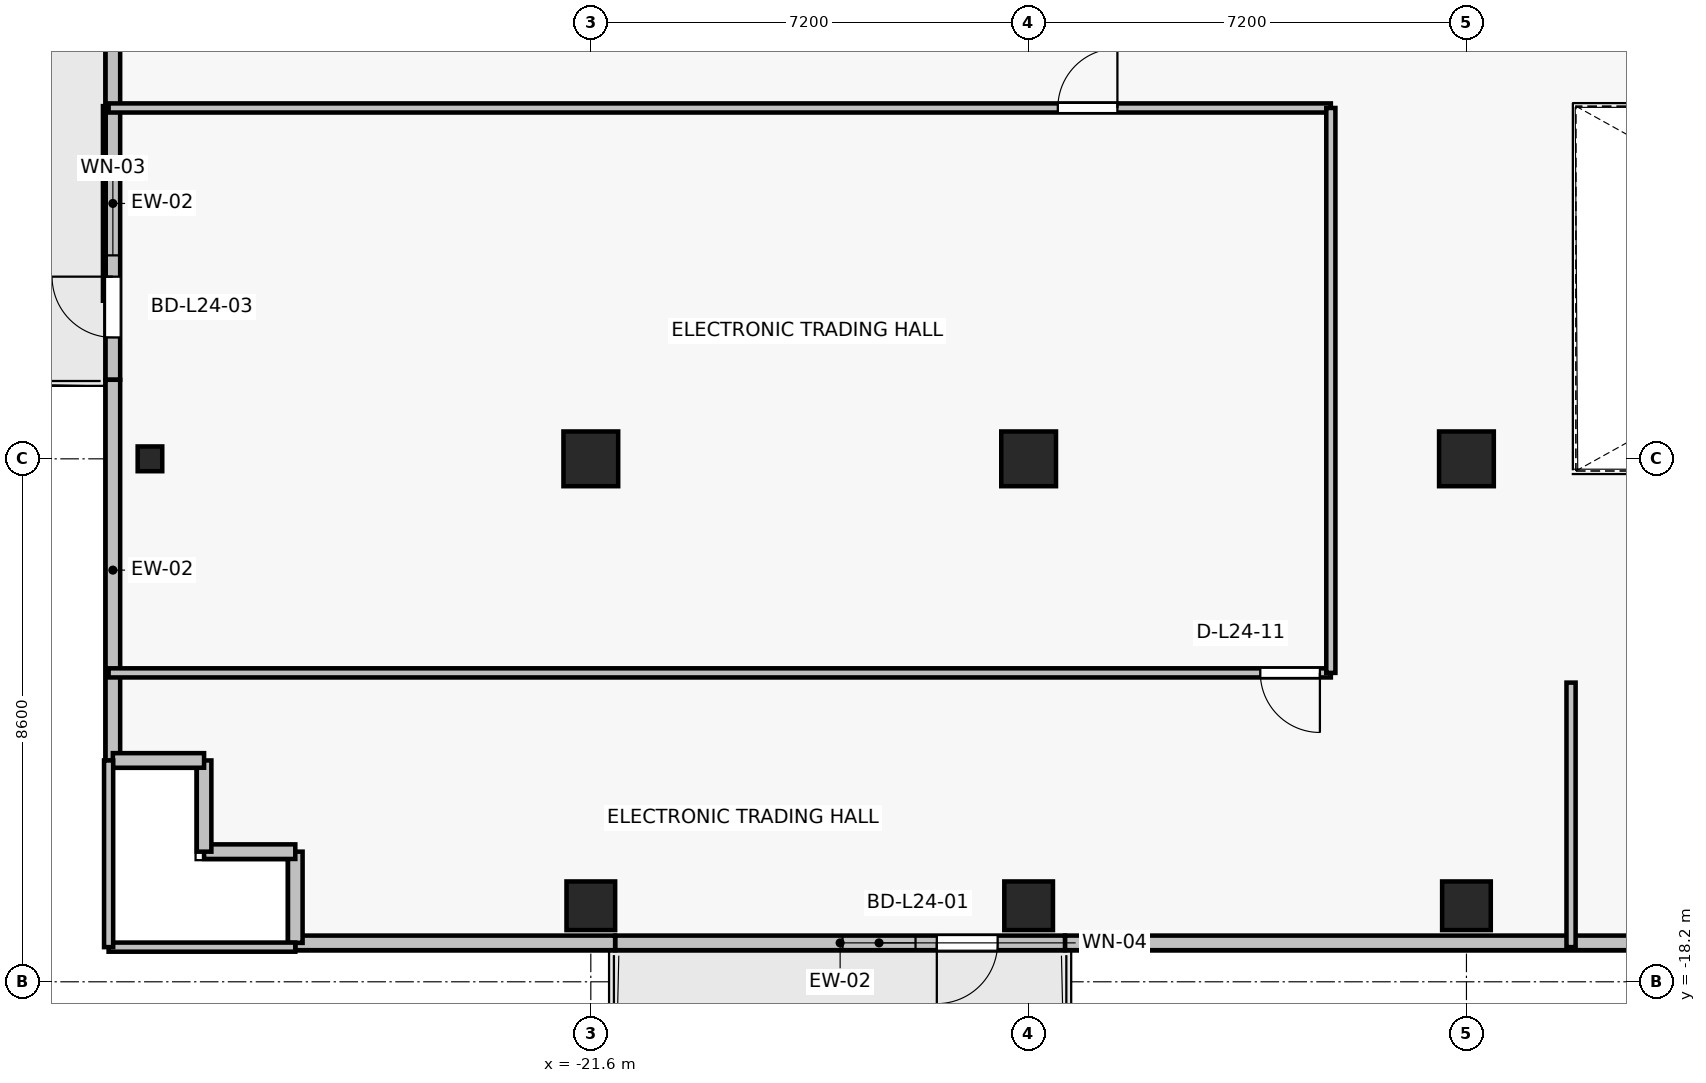
"""IFC4 building model, lengths in metres.
Left out: names, types, materials, properties, quantities, classifications, styles, units other than length and angle.
Written with IfcOpenShell. Run it as: python <this file> out.ifc"""

import sys

from ifc_helpers import new_model, si_unit, direction, frame, frame_2d, origin, origin_2d, place, context, subcontext, project, spatial, rectangle, i_section, extrude, source, transform, mapped, element, fill, save


model = new_model("IFC4")
c1 = context("Model", 3, precision=1e-05, world=origin(), true_north=direction((0.0, 1.0)))
c2 = subcontext(c1, "Body", "Model", "MODEL_VIEW")
j1 = project(units=[si_unit("LENGTHUNIT", "METRE"), si_unit("PLANEANGLEUNIT", "RADIAN")], contexts=[c1])
p1 = place(None, origin())
s1 = spatial("IfcSite", under=j1, at=p1, CompositionType="ELEMENT")
p2 = place(p1, origin())
s2 = spatial("IfcBuilding", under=s1, at=p2, CompositionType="ELEMENT")
p3 = place(p2, frame((0.0, 0.0, 90.1)))
s3 = spatial("IfcBuildingStorey", under=s2, at=p3, CompositionType="ELEMENT", Elevation=90.1)
for number, where, z_axis, x_axis in (
    (1, (-14.4, -9.6, 0.0), (0.0, 0.0, 1.0), (1.0, 0.0, 0.0)),
    (2, (-7.2, -9.6, 0.0), (0.0, 0.0, 1.0), (1.0, 0.0, 0.0)),
    (3, (-21.6, -9.6, 0.0), (0.0, 0.0, 1.0), (1.0, 0.0, 0.0)),
):
    element("IfcColumn", number, at=place(p3, frame(where, z_axis=z_axis, x_axis=x_axis)), inside=s3, PredefinedType="COLUMN", context=c2, shape_type="SweptSolid", body=[
        extrude(rectangle(XDim=0.9, YDim=0.9, at=origin_2d()), origin(), (0.0, 0.0, 1.0), 3.3),
    ])
for number, where, z_axis, x_axis in (
    (4, (-14.4, -16.95, 0.0), (0.0, 0.0, 1.0), (1.0, 0.0, 0.0)),
    (5, (-7.2, -16.95, 0.0), (0.0, 0.0, 1.0), (1.0, 0.0, 0.0)),
    (6, (-21.6, -16.95, 0.0), (0.0, 0.0, 1.0), (1.0, 0.0, 0.0)),
):
    element("IfcColumn", number, at=place(p3, frame(where, z_axis=z_axis, x_axis=x_axis)), inside=s3, PredefinedType="COLUMN", context=c2, shape_type="SweptSolid", body=[
        extrude(rectangle(XDim=0.8, YDim=0.8, at=origin_2d()), origin(), (0.0, 0.0, 1.0), 3.3),
    ])
p4 = place(p3, frame((-28.85, -9.6, 0.0), z_axis=(0.0, 0.0, 1.0), x_axis=(1.0, 0.0, 0.0)))
e7 = element("IfcColumn", 7, at=p4, inside=s3, PredefinedType="COLUMN", context=c2, shape_type="SweptSolid", body=[
    extrude(i_section(OverallWidth=0.404, OverallDepth=0.407, WebThickness=0.022, FlangeThickness=0.032, FilletRadius=0.015, at=origin_2d()), origin(), (0.0, 0.0, 1.0), 3.3),
])
p5 = place(p3, frame((-13.8, -17.56, 0.0), z_axis=(0.0, 0.0, 1.0), x_axis=(-1.0, 0.0, 0.0)))
e8 = element("IfcWall", 8, at=p5, inside=s3, PredefinedType="SOLIDWALL", context=c2, shape_type="SweptSolid", body=[
    extrude(rectangle(XDim=7.4, YDim=0.24, at=frame_2d((3.7, 0.0))), origin(), (0.0, 0.0, 1.0), 2.665),
])
p6 = place(p5, frame((1.11, 0.0, 0.0)))
e9 = element("IfcOpeningElement", 9, at=p6, cuts=e8, PredefinedType="OPENING", context=c2, shape_type="SweptSolid", body=[
    extrude(rectangle(XDim=1.0, YDim=2.2, at=frame_2d((0.5, 1.1))), frame((0.0, 0.13, 0.0), z_axis=(0.0, -1.0, 0.0), x_axis=(1.0, 0.0, 0.0)), (0.0, 0.0, 1.0), 0.26),
])
p7 = place(p5, frame((2.46, 0.0, 0.85)))
e10 = element("IfcOpeningElement", 10, at=p7, cuts=e8, PredefinedType="OPENING", context=c2, shape_type="SweptSolid", body=[
    extrude(rectangle(XDim=1.2, YDim=1.5, at=frame_2d((0.6, 0.75))), frame((0.0, 0.13, 0.0), z_axis=(0.0, -1.0, 0.0), x_axis=(1.0, 0.0, 0.0)), (0.0, 0.0, 1.0), 0.26),
])
p8 = place(p3, frame((-29.46, -8.3, 0.0), z_axis=(0.0, 0.0, 1.0), x_axis=(0.0, 1.0, 0.0)))
e11 = element("IfcWall", 11, at=p8, inside=s3, PredefinedType="SOLIDWALL", context=c2, shape_type="SweptSolid", body=[
    extrude(rectangle(XDim=5.8, YDim=0.24, at=frame_2d((2.9, 0.0))), origin(), (0.0, 0.0, 1.0), 3.075),
])
p9 = place(p8, frame((0.696, 0.0, 0.0)))
e12 = element("IfcOpeningElement", 12, at=p9, cuts=e11, PredefinedType="OPENING", context=c2, shape_type="SweptSolid", body=[
    extrude(rectangle(XDim=1.0, YDim=2.2, at=frame_2d((0.5, 1.1))), frame((0.0, 0.13, 0.0), z_axis=(0.0, -1.0, 0.0), x_axis=(1.0, 0.0, 0.0)), (0.0, 0.0, 1.0), 0.26),
])
p10 = place(p8, frame((2.046, 0.0, 0.85)))
e13 = element("IfcOpeningElement", 13, at=p10, cuts=e11, PredefinedType="OPENING", context=c2, shape_type="SweptSolid", body=[
    extrude(rectangle(XDim=1.5, YDim=1.6, at=frame_2d((0.75, 0.8))), frame((0.0, 0.13, 0.0), z_axis=(0.0, -1.0, 0.0), x_axis=(1.0, 0.0, 0.0)), (0.0, 0.0, 1.0), 0.26),
])
p11 = place(p3, frame((-29.46, -8.3, 0.0), z_axis=(0.0, 0.0, 1.0), x_axis=(0.0, -1.0, 0.0)))
e14 = element("IfcWall", 14, at=p11, inside=s3, PredefinedType="SOLIDWALL", context=c2, shape_type="SweptSolid", body=[
    extrude(rectangle(XDim=6.26, YDim=0.24, at=frame_2d((3.13, 0.0))), origin(), (0.0, 0.0, 1.0), 3.075),
])
p12 = place(p3, frame((-13.8, -17.56, 0.0), z_axis=(0.0, 0.0, 1.0), x_axis=(1.0, 0.0, 0.0)))
e15 = element("IfcWall", 15, at=p12, inside=s3, PredefinedType="SOLIDWALL", context=c2, shape_type="SweptSolid", body=[
    extrude(rectangle(XDim=10.46, YDim=0.24, at=frame_2d((5.23, 0.0))), origin(), (0.0, 0.0, 1.0), 2.665),
])
p13 = place(p3, frame((-26.46, -17.56, 0.0), z_axis=(0.0, 0.0, 1.0), x_axis=(1.0, 0.0, 0.0)))
e16 = element("IfcWall", 16, at=p13, inside=s3, PredefinedType="SOLIDWALL", context=c2, shape_type="SweptSolid", body=[
    extrude(rectangle(XDim=5.26, YDim=0.24, at=frame_2d((2.63, 0.0))), origin(), (0.0, 0.0, 1.0), 3.075),
])
for number, where, z_axis, x_axis in (
    (17, (-26.46, -16.06, 0.0), (0.0, 0.0, 1.0), (0.0, -1.0, 0.0)),
    (18, (-27.96, -16.06, 0.0), (0.0, 0.0, 1.0), (1.0, 0.0, 0.0)),
    (19, (-27.96, -14.56, 0.0), (0.0, 0.0, 1.0), (0.0, -1.0, 0.0)),
    (20, (-29.46, -14.56, 0.0), (0.0, 0.0, 1.0), (1.0, 0.0, 0.0)),
):
    element("IfcWall", number, at=place(p3, frame(where, z_axis=z_axis, x_axis=x_axis)), inside=s3, PredefinedType="SOLIDWALL", context=c2, shape_type="SweptSolid", body=[
        extrude(rectangle(XDim=1.5, YDim=0.24, at=frame_2d((0.75, 0.0))), origin(), (0.0, 0.0, 1.0), 3.075),
    ])
p14 = place(p3, frame((-9.43, -13.12, 0.0), z_axis=(0.0, 0.0, 1.0), x_axis=(-1.0, 0.0, 0.0)))
e21 = element("IfcWall", 21, at=p14, inside=s3, PredefinedType="PARTITIONING", context=c2, shape_type="SweptSolid", body=[
    extrude(rectangle(XDim=20.1, YDim=0.15, at=frame_2d((10.05, 0.0))), origin(), (0.0, 0.0, 1.0), 2.515),
])
p15 = place(p14, frame((0.18, 0.0, 0.0)))
e22 = element("IfcOpeningElement", 22, at=p15, cuts=e21, PredefinedType="OPENING", context=c2, shape_type="SweptSolid", body=[
    extrude(rectangle(XDim=0.98, YDim=2.15, at=frame_2d((0.49, 1.075))), frame((0.0, 0.085, 0.0), z_axis=(0.0, -1.0, 0.0), x_axis=(1.0, 0.0, 0.0)), (0.0, 0.0, 1.0), 0.17),
])
p16 = place(p3, frame((-29.53, -3.83, 0.0), z_axis=(0.0, 0.0, 1.0), x_axis=(1.0, 0.0, 0.0)))
e23 = element("IfcWall", 23, at=p16, inside=s3, PredefinedType="PARTITIONING", context=c2, shape_type="SweptSolid", body=[
    extrude(rectangle(XDim=20.1, YDim=0.15, at=frame_2d((10.05, 0.0))), origin(), (0.0, 0.0, 1.0), 2.515),
])
p17 = place(p16, frame((15.61, 0.0, 0.0)))
e24 = element("IfcOpeningElement", 24, at=p17, cuts=e23, PredefinedType="OPENING", context=c2, shape_type="SweptSolid", body=[
    extrude(rectangle(XDim=0.98, YDim=2.15, at=frame_2d((0.49, 1.075))), frame((0.0, 0.085, 0.0), z_axis=(0.0, -1.0, 0.0), x_axis=(1.0, 0.0, 0.0)), (0.0, 0.0, 1.0), 0.17),
])
p18 = place(p3, frame((-9.43, -3.83, 0.0), z_axis=(0.0, 0.0, 1.0), x_axis=(0.0, -1.0, 0.0)))
e25 = element("IfcWall", 25, at=p18, inside=s3, PredefinedType="PARTITIONING", context=c2, shape_type="SweptSolid", body=[
    extrude(rectangle(XDim=9.29, YDim=0.15, at=frame_2d((4.645, 0.0))), origin(), (0.0, 0.0, 1.0), 2.515),
])
p19 = place(p3, frame((-26.46, -17.63, 0.0), z_axis=(0.0, 0.0, 1.0), x_axis=(-1.0, 0.0, 0.0)))
e26 = element("IfcWall", 26, at=p19, inside=s3, PredefinedType="PARTITIONING", context=c2, shape_type="SweptSolid", body=[
    extrude(rectangle(XDim=3.07, YDim=0.15, at=frame_2d((1.535, 0.0))), origin(), (0.0, 0.0, 1.0), 2.665),
])
p20 = place(p3, frame((-29.53, -17.63, 0.0), z_axis=(0.0, 0.0, 1.0), x_axis=(0.0, 1.0, 0.0)))
e27 = element("IfcWall", 27, at=p20, inside=s3, PredefinedType="PARTITIONING", context=c2, shape_type="SweptSolid", body=[
    extrude(rectangle(XDim=3.07, YDim=0.15, at=frame_2d((1.535, 0.0))), origin(), (0.0, 0.0, 1.0), 3.075),
])
p21 = place(p3, frame((-5.48, -13.28, 0.0), z_axis=(0.0, 0.0, 1.0), x_axis=(0.0, -1.0, 0.0)))
e28 = element("IfcWall", 28, at=p21, inside=s3, PredefinedType="PARTITIONING", context=c2, shape_type="SweptSolid", body=[
    extrude(rectangle(XDim=4.35, YDim=0.15, at=frame_2d((2.175, 0.0))), origin(), (0.0, 0.0, 1.0), 2.565),
])
m1 = source(origin(), c2, "Body", "SweptSolid", [
    extrude(rectangle(XDim=1.0, YDim=2.2, at=frame_2d((0.5, 1.1))), frame((0.0, 0.025, 0.0), z_axis=(0.0, -1.0, 0.0), x_axis=(1.0, 0.0, 0.0)), (0.0, 0.0, 1.0), 0.05),
])
p22 = place(p6, origin())
e29 = element("IfcDoor", 29, at=p22, inside=s3, OperationType="SINGLE_SWING_RIGHT", PredefinedType="DOOR", context=c2, shape_type="MappedRepresentation", body=[
    mapped(m1, transform((0.0, 0.0, 0.0), x_axis=(1.0, 0.0, 0.0), y_axis=(0.0, 1.0, 0.0), z_axis=(0.0, 0.0, 1.0), scale=1.0)),
])
fill(e9, e29)
m2 = source(origin(), c2, "Body", "SweptSolid", [
    extrude(rectangle(XDim=1.2, YDim=1.5, at=frame_2d((0.6, 0.75))), frame((0.0, 0.03, 0.0), z_axis=(0.0, -1.0, 0.0), x_axis=(1.0, 0.0, 0.0)), (0.0, 0.0, 1.0), 0.06),
])
p23 = place(p7, origin())
e30 = element("IfcWindow", 30, at=p23, inside=s3, PartitioningType="SINGLE_PANEL", PredefinedType="WINDOW", context=c2, shape_type="MappedRepresentation", body=[
    mapped(m2, transform((0.0, 0.0, 0.0), x_axis=(1.0, 0.0, 0.0), y_axis=(0.0, 1.0, 0.0), z_axis=(0.0, 0.0, 1.0), scale=1.0)),
])
fill(e10, e30)
p24 = place(p9, origin())
e31 = element("IfcDoor", 31, at=p24, inside=s3, OperationType="SINGLE_SWING_RIGHT", PredefinedType="DOOR", context=c2, shape_type="MappedRepresentation", body=[
    mapped(m1, transform((0.0, 0.0, 0.0), x_axis=(1.0, 0.0, 0.0), y_axis=(0.0, 1.0, 0.0), z_axis=(0.0, 0.0, 1.0), scale=1.0)),
])
fill(e12, e31)
m3 = source(origin(), c2, "Body", "SweptSolid", [
    extrude(rectangle(XDim=1.5, YDim=1.6, at=frame_2d((0.75, 0.8))), frame((0.0, 0.03, 0.0), z_axis=(0.0, -1.0, 0.0), x_axis=(1.0, 0.0, 0.0)), (0.0, 0.0, 1.0), 0.06),
])
p25 = place(p10, origin())
e32 = element("IfcWindow", 32, at=p25, inside=s3, PartitioningType="SINGLE_PANEL", PredefinedType="WINDOW", context=c2, shape_type="MappedRepresentation", body=[
    mapped(m3, transform((0.0, 0.0, 0.0), x_axis=(1.0, 0.0, 0.0), y_axis=(0.0, 1.0, 0.0), z_axis=(0.0, 0.0, 1.0), scale=1.0)),
])
fill(e13, e32)
m4 = source(origin(), c2, "Body", "SweptSolid", [
    extrude(rectangle(XDim=0.98, YDim=2.15, at=frame_2d((0.49, 1.075))), frame((0.0, 0.025, 0.0), z_axis=(0.0, -1.0, 0.0), x_axis=(1.0, 0.0, 0.0)), (0.0, 0.0, 1.0), 0.05),
])
p26 = place(p17, origin())
e33 = element("IfcDoor", 33, at=p26, inside=s3, OperationType="SINGLE_SWING_RIGHT", PredefinedType="DOOR", context=c2, shape_type="MappedRepresentation", body=[
    mapped(m4, transform((0.0, 0.0, 0.0), x_axis=(1.0, 0.0, 0.0), y_axis=(0.0, 1.0, 0.0), z_axis=(0.0, 0.0, 1.0), scale=1.0)),
])
fill(e24, e33)
p27 = place(p15, origin())
e34 = element("IfcDoor", 34, at=p27, inside=s3, OperationType="SINGLE_SWING_LEFT", PredefinedType="DOOR", context=c2, shape_type="MappedRepresentation", body=[
    mapped(m4, transform((0.0, 0.0, 0.0), x_axis=(1.0, 0.0, 0.0), y_axis=(0.0, 1.0, 0.0), z_axis=(0.0, 0.0, 1.0), scale=1.0)),
])
fill(e22, e34)
save(model, sys.argv[1])
